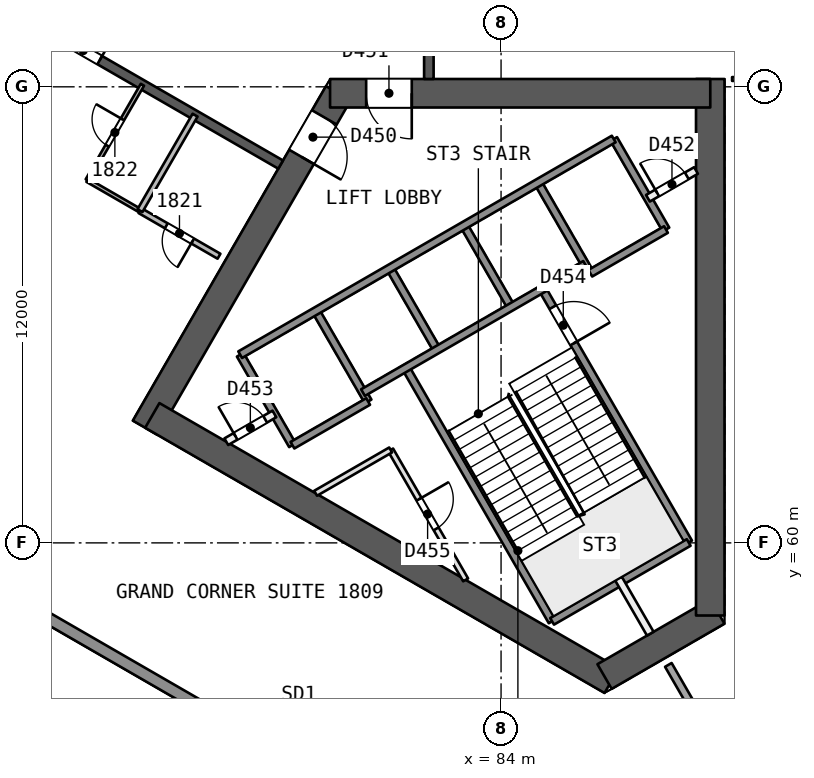
"""IFC4 building model, lengths in metres.
Left out: names, types, materials, properties, quantities, classifications, styles, units other than length and angle.
Written with IfcOpenShell. Run it as: python <this file> out.ifc"""

import sys

from ifc_helpers import new_model, si_unit, direction, frame, frame_2d, origin, place, context, subcontext, project, spatial, rectangle, extrude, element, fill, save


model = new_model("IFC4")
c1 = context("Model", 3, precision=1e-05, world=origin(), true_north=direction((0.0, 1.0)))
c2 = subcontext(c1, "Body", "Model", "MODEL_VIEW")
j1 = project(units=[si_unit("LENGTHUNIT", "METRE"), si_unit("PLANEANGLEUNIT", "RADIAN")], contexts=[c1])
p1 = place(None, origin())
s1 = spatial("IfcSite", under=j1, at=p1, CompositionType="ELEMENT")
p2 = place(p1, origin())
s2 = spatial("IfcBuilding", under=s1, at=p2, CompositionType="ELEMENT")
p3 = place(p2, frame((0.0, 0.0, 79.5)))
s3 = spatial("IfcBuildingStorey", under=s2, at=p3, CompositionType="ELEMENT", Elevation=79.5)
p4 = place(p3, frame((79.717, 71.831, 0.0), z_axis=(0.0, 0.0, 1.0), x_axis=(-0.499996230114, -0.866027580318, 0.0)))
e1 = element("IfcWall", 1, at=p4, inside=s3, PredefinedType="SHEAR", context=c2, shape_type="SweptSolid", body=[
    extrude(rectangle(XDim=10.164, YDim=0.75, at=frame_2d((5.082, 0.0))), origin(), (0.0, 0.0, 1.0), 3.7),
])
p5 = place(p4, frame((0.733, 0.0, 0.0)))
e2 = element("IfcOpeningElement", 2, at=p5, cuts=e1, PredefinedType="OPENING", context=c2, shape_type="SweptSolid", body=[
    extrude(rectangle(XDim=1.2, YDim=2.1, at=frame_2d((0.6, 1.05))), frame((0.0, 0.385, 0.0), z_axis=(0.0, -1.0, 0.0), x_axis=(1.0, 0.0, 0.0)), (0.0, 0.0, 1.0), 0.771),
])
p6 = place(p3, frame((74.822, 63.354, 0.0), z_axis=(0.0, 0.0, 1.0), x_axis=(0.8660248072, -0.500001033313, 0.0)))
e3 = element("IfcWall", 3, at=p6, inside=s3, PredefinedType="SHEAR", context=c2, shape_type="SweptSolid", body=[
    extrude(rectangle(XDim=13.958, YDim=0.75, at=frame_2d((6.979, 0.0))), origin(), (0.0, 0.0, 1.0), 3.7),
])
p7 = place(p3, frame((86.723, 56.483, 0.0), z_axis=(0.0, 0.0, 1.0), x_axis=(0.866017201164, 0.500014207086, 0.0)))
e4 = element("IfcWall", 4, at=p7, inside=s3, PredefinedType="SHEAR", context=c2, shape_type="SweptSolid", body=[
    extrude(rectangle(XDim=3.429, YDim=0.75, at=frame_2d((1.714, 0.0))), origin(), (0.0, 0.0, 1.0), 3.7),
])
p8 = place(p3, frame((89.505, 58.089, 0.0), z_axis=(0.0, 0.0, 1.0), x_axis=(0.0, 1.0, 0.0)))
e5 = element("IfcWall", 5, at=p8, inside=s3, PredefinedType="SHEAR", context=c2, shape_type="SweptSolid", body=[
    extrude(rectangle(XDim=14.117, YDim=0.75, at=frame_2d((7.059, 0.0))), origin(), (0.0, 0.0, 1.0), 3.7),
])
p9 = place(p3, frame((89.505, 71.831, 0.0), z_axis=(0.0, 0.0, 1.0), x_axis=(-1.0, 0.0, 0.0)))
e6 = element("IfcWall", 6, at=p9, inside=s3, PredefinedType="SHEAR", context=c2, shape_type="SweptSolid", body=[
    extrude(rectangle(XDim=10.005, YDim=0.75, at=frame_2d((5.002, 0.0))), origin(), (0.0, 0.0, 1.0), 3.7),
])
p10 = place(p9, frame((7.855, 0.0, 0.0)))
e7 = element("IfcOpeningElement", 7, at=p10, cuts=e6, PredefinedType="OPENING", context=c2, shape_type="SweptSolid", body=[
    extrude(rectangle(XDim=1.2, YDim=2.1, at=frame_2d((0.6, 1.05))), frame((0.0, 0.385, 0.0), z_axis=(0.0, -1.0, 0.0), x_axis=(1.0, 0.0, 0.0)), (0.0, 0.0, 1.0), 0.771),
])
p11 = place(p3, frame((82.1, 72.206, 0.0), z_axis=(0.0, 0.0, 1.0), x_axis=(0.0, 1.0, 0.0)))
e8 = element("IfcWall", 8, at=p11, inside=s3, PredefinedType="SHEAR", context=c2, shape_type="SweptSolid", body=[
    extrude(rectangle(XDim=15.588, YDim=0.25, at=frame_2d((7.794, 0.0))), origin(), (0.0, 0.0, 1.0), 3.2),
])
p12 = place(p11, frame((1.448, 0.0, 0.0)))
e9 = element("IfcOpeningElement", 9, at=p12, cuts=e8, PredefinedType="OPENING", context=c2, shape_type="SweptSolid", body=[
    extrude(rectangle(XDim=1.0, YDim=2.1, at=frame_2d((0.5, 1.05))), frame((0.0, 0.135, 0.0), z_axis=(0.0, -1.0, 0.0), x_axis=(1.0, 0.0, 0.0)), (0.0, 0.0, 1.0), 0.271),
])
p13 = place(p11, frame((6.544, 0.0, 0.0)))
e10 = element("IfcOpeningElement", 10, at=p13, cuts=e8, PredefinedType="OPENING", context=c2, shape_type="SweptSolid", body=[
    extrude(rectangle(XDim=1.0, YDim=2.1, at=frame_2d((0.5, 1.05))), frame((0.0, 0.135, 0.0), z_axis=(0.0, -1.0, 0.0), x_axis=(1.0, 0.0, 0.0)), (0.0, 0.0, 1.0), 0.271),
])
p14 = place(p11, frame((10.441, 0.0, 0.0)))
e11 = element("IfcOpeningElement", 11, at=p14, cuts=e8, PredefinedType="OPENING", context=c2, shape_type="SweptSolid", body=[
    extrude(rectangle(XDim=1.0, YDim=2.1, at=frame_2d((0.5, 1.05))), frame((0.0, 0.135, 0.0), z_axis=(0.0, -1.0, 0.0), x_axis=(1.0, 0.0, 0.0)), (0.0, 0.0, 1.0), 0.271),
])
p15 = place(p11, frame((11.841, 0.0, 0.0)))
e12 = element("IfcOpeningElement", 12, at=p15, cuts=e8, PredefinedType="OPENING", context=c2, shape_type="SweptSolid", body=[
    extrude(rectangle(XDim=1.0, YDim=2.1, at=frame_2d((0.5, 1.05))), frame((0.0, 0.135, 0.0), z_axis=(0.0, -1.0, 0.0), x_axis=(1.0, 0.0, 0.0)), (0.0, 0.0, 1.0), 0.271),
])
p16 = place(p3, frame((64.7, 77.748, 0.0), z_axis=(0.0, 0.0, 1.0), x_axis=(0.866026492143, -0.499998114903, 0.0)))
e13 = element("IfcWall", 13, at=p16, inside=s3, PredefinedType="SHEAR", context=c2, shape_type="SweptSolid", body=[
    extrude(rectangle(XDim=15.588, YDim=0.25, at=frame_2d((7.794, 0.0))), origin(), (0.0, 0.0, 1.0), 3.2),
])
p17 = place(p16, frame((3.397, 0.0, 0.0)))
e14 = element("IfcOpeningElement", 14, at=p17, cuts=e13, PredefinedType="OPENING", context=c2, shape_type="SweptSolid", body=[
    extrude(rectangle(XDim=1.0, YDim=2.1, at=frame_2d((0.5, 1.05))), frame((0.0, 0.135, 0.0), z_axis=(0.0, -1.0, 0.0), x_axis=(1.0, 0.0, 0.0)), (0.0, 0.0, 1.0), 0.271),
])
p18 = place(p16, frame((9.091, 0.0, 0.0)))
e15 = element("IfcOpeningElement", 15, at=p18, cuts=e13, PredefinedType="OPENING", context=c2, shape_type="SweptSolid", body=[
    extrude(rectangle(XDim=1.0, YDim=2.1, at=frame_2d((0.5, 1.05))), frame((0.0, 0.135, 0.0), z_axis=(0.0, -1.0, 0.0), x_axis=(1.0, 0.0, 0.0)), (0.0, 0.0, 1.0), 0.271),
])
p19 = place(p3, frame((90.079, 72.206, 0.0), z_axis=(0.0, 0.0, 1.0), x_axis=(1.0, 0.0, 0.0)))
e16 = element("IfcWall", 16, at=p19, inside=s3, PredefinedType="PARTITIONING", context=c2, shape_type="SweptSolid", body=[
    extrude(rectangle(XDim=5.272, YDim=0.1, at=frame_2d((2.636, 0.0))), origin(), (0.0, 0.0, 1.0), 3.2),
])
p20 = place(p19, frame((2.186, 0.0, 0.0)))
e17 = element("IfcOpeningElement", 17, at=p20, cuts=e16, PredefinedType="OPENING", context=c2, shape_type="SweptSolid", body=[
    extrude(rectangle(XDim=0.9, YDim=2.1, at=frame_2d((0.45, 1.05))), frame((0.0, 0.061, 0.0), z_axis=(0.0, -1.0, 0.0), x_axis=(1.0, 0.0, 0.0)), (0.0, 0.0, 1.0), 0.121),
])
p21 = place(p3, frame((88.402, 56.789, 0.0), z_axis=(0.0, 0.0, 1.0), x_axis=(0.500006592492, -0.866021597574, 0.0)))
e18 = element("IfcWall", 18, at=p21, inside=s3, PredefinedType="PARTITIONING", context=c2, shape_type="SweptSolid", body=[
    extrude(rectangle(XDim=8.826, YDim=0.2, at=frame_2d((4.413, 0.0))), origin(), (0.0, 0.0, 1.0), 3.2),
])
p22 = place(p3, frame((76.578, 67.542, 0.0), z_axis=(0.0, 0.0, 1.0), x_axis=(-0.866038271014, 0.499977712642, 0.0)))
e19 = element("IfcWall", 19, at=p22, inside=s3, PredefinedType="PARTITIONING", context=c2, shape_type="SweptSolid", body=[
    extrude(rectangle(XDim=2.401, YDim=0.15, at=frame_2d((1.2, 0.0))), origin(), (0.0, 0.0, 1.0), 3.2),
])
p23 = place(p22, frame((0.801, 0.0, 0.0)))
e20 = element("IfcOpeningElement", 20, at=p23, cuts=e19, PredefinedType="OPENING", context=c2, shape_type="SweptSolid", body=[
    extrude(rectangle(XDim=0.8, YDim=2.1, at=frame_2d((0.4, 1.05))), frame((0.0, 0.085, 0.0), z_axis=(0.0, -1.0, 0.0), x_axis=(1.0, 0.0, 0.0)), (0.0, 0.0, 1.0), 0.171),
])
p24 = place(p3, frame((74.498, 68.743, 0.0), z_axis=(0.0, 0.0, 1.0), x_axis=(-0.865989903783, 0.500061482766, 0.0)))
e21 = element("IfcWall", 21, at=p24, inside=s3, PredefinedType="PARTITIONING", context=c2, shape_type="SweptSolid", body=[
    extrude(rectangle(XDim=1.6, YDim=0.1, at=frame_2d((0.8, 0.0))), origin(), (0.0, 0.0, 1.0), 3.2),
])
p25 = place(p3, frame((73.113, 69.543, 0.0), z_axis=(0.0, 0.0, 1.0), x_axis=(0.499987231761, 0.866032775405, 0.0)))
e22 = element("IfcWall", 22, at=p25, inside=s3, PredefinedType="PARTITIONING", context=c2, shape_type="SweptSolid", body=[
    extrude(rectangle(XDim=2.9, YDim=0.1, at=frame_2d((1.45, 0.0))), origin(), (0.0, 0.0, 1.0), 3.2),
])
p26 = place(p25, frame((1.05, 0.0, 0.0)))
e23 = element("IfcOpeningElement", 23, at=p26, cuts=e22, PredefinedType="OPENING", context=c2, shape_type="SweptSolid", body=[
    extrude(rectangle(XDim=0.8, YDim=2.1, at=frame_2d((0.4, 1.05))), frame((0.0, 0.061, 0.0), z_axis=(0.0, -1.0, 0.0), x_axis=(1.0, 0.0, 0.0)), (0.0, 0.0, 1.0), 0.121),
])
p27 = place(p3, frame((75.948, 71.254, 0.0), z_axis=(0.0, 0.0, 1.0), x_axis=(-0.499987231761, -0.866032775405, 0.0)))
e24 = element("IfcWall", 24, at=p27, inside=s3, PredefinedType="PARTITIONING", context=c2, shape_type="SweptSolid", body=[
    extrude(rectangle(XDim=2.9, YDim=0.15, at=frame_2d((1.45, 0.0))), origin(), (0.0, 0.0, 1.0), 3.2),
])
p28 = place(p3, frame((90.276, 47.508, 0.0), z_axis=(0.0, 0.0, 1.0), x_axis=(-0.86602468924, 0.500001237625, 0.0)))
e25 = element("IfcWall", 25, at=p28, inside=s3, PredefinedType="SOLIDWALL", context=c2, shape_type="SweptSolid", body=[
    extrude(rectangle(XDim=58.951, YDim=0.3, at=frame_2d((29.476, 0.0))), origin(), (0.0, 0.0, 1.0), 3.2),
])
p29 = place(p28, frame((32.173, 0.0, 0.0)))
e26 = element("IfcOpeningElement", 26, at=p29, cuts=e25, PredefinedType="OPENING", context=c2, shape_type="SweptSolid", body=[
    extrude(rectangle(XDim=2.4, YDim=2.4, at=frame_2d((1.2, 1.2))), frame((0.0, 0.161, 0.0), z_axis=(0.0, -1.0, 0.0), x_axis=(1.0, 0.0, 0.0)), (0.0, 0.0, 1.0), 0.321),
])
p30 = place(p28, frame((45.739, 0.0, 0.0)))
e27 = element("IfcOpeningElement", 27, at=p30, cuts=e25, PredefinedType="OPENING", context=c2, shape_type="SweptSolid", body=[
    extrude(rectangle(XDim=2.4, YDim=2.4, at=frame_2d((1.2, 1.2))), frame((0.0, 0.161, 0.0), z_axis=(0.0, -1.0, 0.0), x_axis=(1.0, 0.0, 0.0)), (0.0, 0.0, 1.0), 0.321),
])
p31 = place(p28, frame((13.495, 0.0, 0.0)))
e28 = element("IfcOpeningElement", 28, at=p31, cuts=e25, PredefinedType="OPENING", context=c2, shape_type="SweptSolid", body=[
    extrude(rectangle(XDim=2.4, YDim=2.4, at=frame_2d((1.2, 1.2))), frame((0.0, 0.161, 0.0), z_axis=(0.0, -1.0, 0.0), x_axis=(1.0, 0.0, 0.0)), (0.0, 0.0, 1.0), 0.321),
])
p32 = place(p3, frame((77.135, 64.952, 0.0), z_axis=(0.0, 0.0, 1.0), x_axis=(0.499996545922, -0.866027397988, 0.0)))
e29 = element("IfcWall", 29, at=p32, inside=s3, PredefinedType="SOLIDWALL", context=c2, shape_type="SweptSolid", body=[
    extrude(rectangle(XDim=2.75, YDim=0.2, at=frame_2d((1.375, 0.0))), origin(), (0.0, 0.0, 1.0), 3.2),
])
p33 = place(p3, frame((81.094, 62.445, 0.0), z_axis=(0.0, 0.0, 1.0), x_axis=(0.499990112884, -0.866031112038, 0.0)))
e30 = element("IfcWall", 30, at=p33, inside=s3, PredefinedType="PARTITIONING", context=c2, shape_type="SweptSolid", body=[
    extrude(rectangle(XDim=3.948, YDim=0.15, at=frame_2d((1.974, 0.0))), origin(), (0.0, 0.0, 1.0), 3.2),
])
p34 = place(p33, frame((1.496, 0.0, 0.0)))
e31 = element("IfcOpeningElement", 31, at=p34, cuts=e30, PredefinedType="OPENING", context=c2, shape_type="SweptSolid", body=[
    extrude(rectangle(XDim=0.9, YDim=2.1, at=frame_2d((0.45, 1.05))), frame((0.0, 0.085, 0.0), z_axis=(0.0, -1.0, 0.0), x_axis=(1.0, 0.0, 0.0)), (0.0, 0.0, 1.0), 0.171),
])
p35 = place(p3, frame((79.127, 66.102, 0.0), z_axis=(0.0, 0.0, 1.0), x_axis=(0.499996545922, -0.866027397988, 0.0)))
e32 = element("IfcWall", 32, at=p35, inside=s3, PredefinedType="SOLIDWALL", context=c2, shape_type="SweptSolid", body=[
    extrude(rectangle(XDim=2.75, YDim=0.2, at=frame_2d((1.375, 0.0))), origin(), (0.0, 0.0, 1.0), 3.2),
])
p36 = place(p3, frame((81.493, 64.604, 0.0), z_axis=(0.0, 0.0, 1.0), x_axis=(0.500006057782, -0.866021906294, 0.0)))
e33 = element("IfcWall", 33, at=p36, inside=s3, PredefinedType="SOLIDWALL", context=c2, shape_type="SweptSolid", body=[
    extrude(rectangle(XDim=7.7, YDim=0.2, at=frame_2d((3.85, 0.0))), origin(), (0.0, 0.0, 1.0), 3.2),
])
p37 = place(p3, frame((81.076, 67.227, 0.0), z_axis=(0.0, 0.0, 1.0), x_axis=(0.50000366821, -0.866023285932, 0.0)))
e34 = element("IfcWall", 34, at=p37, inside=s3, PredefinedType="SOLIDWALL", context=c2, shape_type="SweptSolid", body=[
    extrude(rectangle(XDim=2.48, YDim=0.2, at=frame_2d((1.24, 0.0))), origin(), (0.0, 0.0, 1.0), 3.2),
])
p38 = place(p3, frame((87.09, 59.06, 0.0), z_axis=(0.0, 0.0, 1.0), x_axis=(0.499937194881, -0.866061661301, 0.0)))
e35 = element("IfcWall", 35, at=p38, inside=s3, PredefinedType="PARTITIONING", context=c2, shape_type="SweptSolid", body=[
    extrude(rectangle(XDim=1.673, YDim=0.2, at=frame_2d((0.836, 0.0))), origin(), (0.0, 0.0, 1.0), 3.2),
])
p39 = place(p3, frame((83.024, 68.352, 0.0), z_axis=(0.0, 0.0, 1.0), x_axis=(0.50000366821, -0.866023285932, 0.0)))
e36 = element("IfcWall", 36, at=p39, inside=s3, PredefinedType="SOLIDWALL", context=c2, shape_type="SweptSolid", body=[
    extrude(rectangle(XDim=2.48, YDim=0.2, at=frame_2d((1.24, 0.0))), origin(), (0.0, 0.0, 1.0), 3.2),
])
p40 = place(p3, frame((85.087, 66.679, 0.0), z_axis=(0.0, 0.0, 1.0), x_axis=(0.500019787375, -0.866013979237, 0.0)))
e37 = element("IfcWall", 37, at=p40, inside=s3, PredefinedType="SOLIDWALL", context=c2, shape_type="SweptSolid", body=[
    extrude(rectangle(XDim=7.7, YDim=0.2, at=frame_2d((3.85, 0.0))), origin(), (0.0, 0.0, 1.0), 3.2),
])
p41 = place(p40, frame((0.55, 0.0, 0.0)))
e38 = element("IfcOpeningElement", 38, at=p41, cuts=e37, PredefinedType="OPENING", context=c2, shape_type="SweptSolid", body=[
    extrude(rectangle(XDim=1.1, YDim=2.1, at=frame_2d((0.55, 1.05))), frame((0.0, 0.11, 0.0), z_axis=(0.0, -1.0, 0.0), x_axis=(1.0, 0.0, 0.0)), (0.0, 0.0, 1.0), 0.221),
])
for number, where, z_axis, x_axis in (
    (39, (84.973, 69.477, 0.0), (0.0, 0.0, 1.0), (0.5, -0.866, 0.0)),
    (40, (86.965, 70.626, 0.0), (0.0, 0.0, 1.0), (0.5, -0.866, 0.0)),
):
    element("IfcWall", number, at=place(p3, frame(where, z_axis=z_axis, x_axis=x_axis)), inside=s3, PredefinedType="SOLIDWALL", context=c2, shape_type="SweptSolid", body=[
        extrude(rectangle(XDim=2.75, YDim=0.2, at=frame_2d((1.375, 0.0))), origin(), (0.0, 0.0, 1.0), 3.2),
    ])
p42 = place(p3, frame((77.135, 64.952, 0.0), z_axis=(0.0, 0.0, 1.0), x_axis=(0.866031916153, 0.499988720078, 0.0)))
e41 = element("IfcWall", 41, at=p42, inside=s3, PredefinedType="SOLIDWALL", context=c2, shape_type="SweptSolid", body=[
    extrude(rectangle(XDim=11.35, YDim=0.2, at=frame_2d((5.675, 0.0))), origin(), (0.0, 0.0, 1.0), 3.2),
])
p43 = place(p3, frame((76.77, 62.662, 0.0), z_axis=(0.0, 0.0, 1.0), x_axis=(0.866054810376, 0.49994906283, 0.0)))
e42 = element("IfcWall", 42, at=p43, inside=s3, PredefinedType="PARTITIONING", context=c2, shape_type="SweptSolid", body=[
    extrude(rectangle(XDim=1.461, YDim=0.2, at=frame_2d((0.73, 0.0))), origin(), (0.0, 0.0, 1.0), 3.2),
])
p44 = place(p43, frame((0.281, 0.0, 0.0)))
e43 = element("IfcOpeningElement", 43, at=p44, cuts=e42, PredefinedType="OPENING", context=c2, shape_type="SweptSolid", body=[
    extrude(rectangle(XDim=0.9, YDim=2.1, at=frame_2d((0.45, 1.05))), frame((0.0, 0.11, 0.0), z_axis=(0.0, -1.0, 0.0), x_axis=(1.0, 0.0, 0.0)), (0.0, 0.0, 1.0), 0.221),
])
p45 = place(p3, frame((87.865, 69.068, 0.0), z_axis=(0.0, 0.0, 1.0), x_axis=(0.865982457891, 0.500074377092, 0.0)))
e44 = element("IfcWall", 44, at=p45, inside=s3, PredefinedType="PARTITIONING", context=c2, shape_type="SweptSolid", body=[
    extrude(rectangle(XDim=1.461, YDim=0.2, at=frame_2d((0.73, 0.0))), origin(), (0.0, 0.0, 1.0), 3.2),
])
p46 = place(p45, frame((0.281, 0.0, 0.0)))
e45 = element("IfcOpeningElement", 45, at=p46, cuts=e44, PredefinedType="OPENING", context=c2, shape_type="SweptSolid", body=[
    extrude(rectangle(XDim=0.9, YDim=2.1, at=frame_2d((0.45, 1.05))), frame((0.0, 0.11, 0.0), z_axis=(0.0, -1.0, 0.0), x_axis=(1.0, 0.0, 0.0)), (0.0, 0.0, 1.0), 0.221),
])
p47 = place(p3, frame((80.367, 63.954, 0.0), z_axis=(0.0, 0.0, 1.0), x_axis=(0.866026575979, 0.499997969693, 0.0)))
e46 = element("IfcWall", 46, at=p47, inside=s3, PredefinedType="SOLIDWALL", context=c2, shape_type="SweptSolid", body=[
    extrude(rectangle(XDim=6.75, YDim=0.2, at=frame_2d((3.375, 0.0))), origin(), (0.0, 0.0, 1.0), 3.2),
])
p48 = place(p3, frame((78.51, 62.57, 0.0), z_axis=(0.0, 0.0, 1.0), x_axis=(0.866053019151, 0.499952165731, 0.0)))
e47 = element("IfcWall", 47, at=p48, inside=s3, PredefinedType="SOLIDWALL", context=c2, shape_type="SweptSolid", body=[
    extrude(rectangle(XDim=2.3, YDim=0.2, at=frame_2d((1.15, 0.0))), origin(), (0.0, 0.0, 1.0), 3.2),
])
p49 = place(p3, frame((86.348, 67.095, 0.0), z_axis=(0.0, 0.0, 1.0), x_axis=(0.86602648383, 0.499998129301, 0.0)))
e48 = element("IfcWall", 48, at=p49, inside=s3, PredefinedType="SOLIDWALL", context=c2, shape_type="SweptSolid", body=[
    extrude(rectangle(XDim=2.3, YDim=0.2, at=frame_2d((1.15, 0.0))), origin(), (0.0, 0.0, 1.0), 3.2),
])
p50 = place(p3, frame((79.12, 61.305, 0.0), z_axis=(0.0, 0.0, 1.0), x_axis=(0.866046471269, 0.499963508271, 0.0)))
e49 = element("IfcWall", 49, at=p50, inside=s3, PredefinedType="PARTITIONING", context=c2, shape_type="SweptSolid", body=[
    extrude(rectangle(XDim=2.28, YDim=0.15, at=frame_2d((1.14, 0.0))), origin(), (0.0, 0.0, 1.0), 3.2),
])
p51 = place(p3, frame((85.343, 57.935, 0.0), z_axis=(0.0, 0.0, 1.0), x_axis=(0.866004344652, 0.500036473714, 0.0)))
e50 = element("IfcWall", 50, at=p51, inside=s3, PredefinedType="SOLIDWALL", context=c2, shape_type="SweptSolid", body=[
    extrude(rectangle(XDim=4.15, YDim=0.2, at=frame_2d((2.075, 0.0))), origin(), (0.0, 0.0, 1.0), 3.2),
])
p52 = place(p23, origin())
e51 = element("IfcDoor", 51, at=p52, inside=s3, OperationType="SINGLE_SWING_LEFT", PredefinedType="NOTDEFINED", context=c2, shape_type="SweptSolid", body=[
    extrude(rectangle(XDim=0.8, YDim=2.1, at=frame_2d((0.4, 1.05))), frame((0.0, 0.025, 0.0), z_axis=(0.0, -1.0, 0.0), x_axis=(1.0, 0.0, 0.0)), (0.0, 0.0, 1.0), 0.05),
])
fill(e20, e51)
p53 = place(p26, origin())
e52 = element("IfcDoor", 52, at=p53, inside=s3, OperationType="SINGLE_SWING_RIGHT", PredefinedType="NOTDEFINED", context=c2, shape_type="SweptSolid", body=[
    extrude(rectangle(XDim=0.8, YDim=2.1, at=frame_2d((0.4, 1.05))), frame((0.0, 0.025, 0.0), z_axis=(0.0, -1.0, 0.0), x_axis=(1.0, 0.0, 0.0)), (0.0, 0.0, 1.0), 0.05),
])
fill(e23, e52)
p54 = place(p18, origin())
e53 = element("IfcDoor", 53, at=p54, inside=s3, OperationType="SINGLE_SWING_RIGHT", PredefinedType="NOTDEFINED", context=c2, shape_type="SweptSolid", body=[
    extrude(rectangle(XDim=1.0, YDim=2.1, at=frame_2d((0.5, 1.05))), frame((0.0, 0.025, 0.0), z_axis=(0.0, -1.0, 0.0), x_axis=(1.0, 0.0, 0.0)), (0.0, 0.0, 1.0), 0.05),
])
fill(e15, e53)
p55 = place(p5, origin())
e54 = element("IfcDoor", 54, at=p55, inside=s3, OperationType="SINGLE_SWING_RIGHT", PredefinedType="NOTDEFINED", context=c2, shape_type="SweptSolid", body=[
    extrude(rectangle(XDim=1.2, YDim=2.1, at=frame_2d((0.6, 1.05))), frame((0.0, 0.025, 0.0), z_axis=(0.0, -1.0, 0.0), x_axis=(1.0, 0.0, 0.0)), (0.0, 0.0, 1.0), 0.05),
])
fill(e2, e54)
p56 = place(p10, origin())
e55 = element("IfcDoor", 55, at=p56, inside=s3, OperationType="SINGLE_SWING_LEFT", PredefinedType="NOTDEFINED", context=c2, shape_type="SweptSolid", body=[
    extrude(rectangle(XDim=1.2, YDim=2.1, at=frame_2d((0.6, 1.05))), frame((0.0, 0.025, 0.0), z_axis=(0.0, -1.0, 0.0), x_axis=(1.0, 0.0, 0.0)), (0.0, 0.0, 1.0), 0.05),
])
fill(e7, e55)
p57 = place(p46, origin())
e56 = element("IfcDoor", 56, at=p57, inside=s3, OperationType="SINGLE_SWING_LEFT", PredefinedType="NOTDEFINED", context=c2, shape_type="SweptSolid", body=[
    extrude(rectangle(XDim=0.9, YDim=2.1, at=frame_2d((0.45, 1.05))), frame((0.0, 0.025, 0.0), z_axis=(0.0, -1.0, 0.0), x_axis=(1.0, 0.0, 0.0)), (0.0, 0.0, 1.0), 0.05),
])
fill(e45, e56)
p58 = place(p44, origin())
e57 = element("IfcDoor", 57, at=p58, inside=s3, OperationType="SINGLE_SWING_LEFT", PredefinedType="NOTDEFINED", context=c2, shape_type="SweptSolid", body=[
    extrude(rectangle(XDim=0.9, YDim=2.1, at=frame_2d((0.45, 1.05))), frame((0.0, 0.025, 0.0), z_axis=(0.0, -1.0, 0.0), x_axis=(1.0, 0.0, 0.0)), (0.0, 0.0, 1.0), 0.05),
])
fill(e43, e57)
p59 = place(p41, origin())
e58 = element("IfcDoor", 58, at=p59, inside=s3, OperationType="SINGLE_SWING_RIGHT", PredefinedType="NOTDEFINED", context=c2, shape_type="SweptSolid", body=[
    extrude(rectangle(XDim=1.1, YDim=2.1, at=frame_2d((0.55, 1.05))), frame((0.0, 0.025, 0.0), z_axis=(0.0, -1.0, 0.0), x_axis=(1.0, 0.0, 0.0)), (0.0, 0.0, 1.0), 0.05),
])
fill(e38, e58)
p60 = place(p34, origin())
e59 = element("IfcDoor", 59, at=p60, inside=s3, OperationType="SINGLE_SWING_LEFT", PredefinedType="NOTDEFINED", context=c2, shape_type="SweptSolid", body=[
    extrude(rectangle(XDim=0.9, YDim=2.1, at=frame_2d((0.45, 1.05))), frame((0.0, 0.025, 0.0), z_axis=(0.0, -1.0, 0.0), x_axis=(1.0, 0.0, 0.0)), (0.0, 0.0, 1.0), 0.05),
])
fill(e31, e59)
save(model, sys.argv[1])
